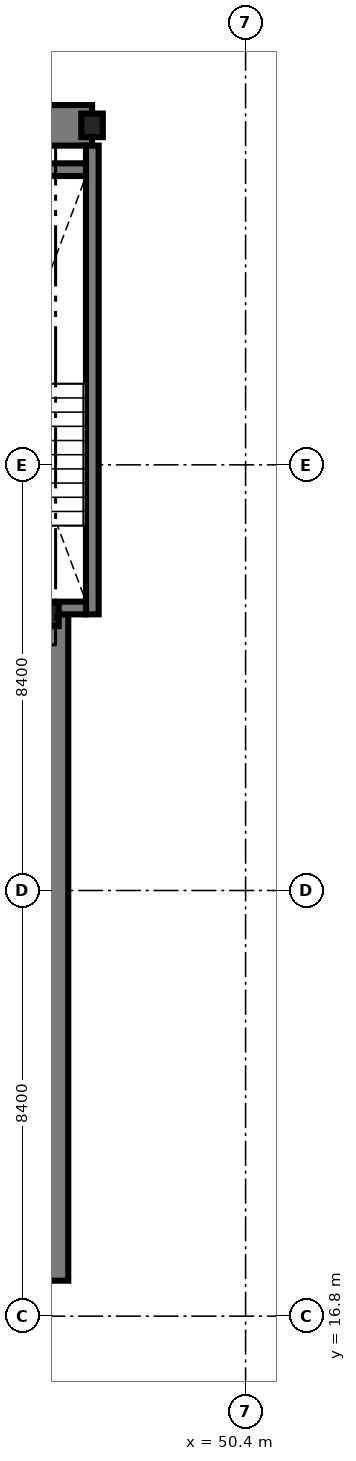
"""IFC4 building model, lengths in metres.
Left out: names, types, materials, properties, quantities, classifications, styles, units other than length and angle.
Written with IfcOpenShell. Run it as: python <this file> out.ifc"""

import sys

from ifc_helpers import new_model, si_unit, direction, frame, frame_2d, origin, origin_2d, place, context, subcontext, project, spatial, rectangle, i_section, extrude, source, transform, mapped, element, save


model = new_model("IFC4")
c1 = context("Model", 3, precision=1e-05, world=origin(), true_north=direction((0.0, 1.0)))
c2 = subcontext(c1, "Body", "Model", "MODEL_VIEW")
j1 = project(units=[si_unit("LENGTHUNIT", "METRE"), si_unit("PLANEANGLEUNIT", "RADIAN")], contexts=[c1])
p1 = place(None, origin())
s1 = spatial("IfcSite", under=j1, at=p1, CompositionType="ELEMENT")
p2 = place(p1, origin())
s2 = spatial("IfcBuilding", under=s1, at=p2, CompositionType="ELEMENT")
p3 = place(p2, frame((0.0, 0.0, 133.5)))
s3 = spatial("IfcBuildingStorey", under=s2, at=p3, CompositionType="ELEMENT", Elevation=133.5)
m1 = source(origin(), c2, "Body", "SweptSolid", [
    extrude(rectangle(XDim=17.52, YDim=0.8, at=frame_2d((8.76, 0.0))), origin(), (0.0, 0.0, 1.0), 3.46),
])
p4 = place(p3, frame((29.85, 40.3, 0.0), z_axis=(0.0, 0.0, 1.0), x_axis=(1.0, 0.0, 0.0)))
e1 = element("IfcWall", 1, at=p4, inside=s3, PredefinedType="SHEAR", context=c2, shape_type="MappedRepresentation", body=[
    mapped(m1, transform((0.0, 0.0, 0.0), scale=1.0)),
])
m2 = source(origin(), c2, "Body", "SweptSolid", [
    extrude(rectangle(XDim=13.15, YDim=0.8, at=frame_2d((6.575, 0.0))), origin(), (0.0, 0.0, 1.0), 3.46),
])
p5 = place(p3, frame((46.5, 17.5, 0.0), z_axis=(0.0, 0.0, 1.0), x_axis=(0.0, 1.0, 0.0)))
e2 = element("IfcWall", 2, at=p5, inside=s3, PredefinedType="SHEAR", context=c2, shape_type="MappedRepresentation", body=[
    mapped(m2, transform((0.0, 0.0, 0.0), scale=1.0)),
])
m3 = source(origin(), c2, "Body", "SweptSolid", [
    extrude(i_section(OverallWidth=0.424, OverallDepth=0.465, WebThickness=0.035, FlangeThickness=0.056, FilletRadius=0.015, at=origin_2d()), origin(), (0.0, 0.0, 1.0), 3.46),
])
for number, where, z_axis, x_axis in (
    (3, (46.5, 30.65, 0.0), (0.0, 0.0, 1.0), (1.0, 0.0, 0.0)),
    (4, (47.37, 40.3, 0.0), (0.0, 0.0, 1.0), (1.0, 0.0, 0.0)),
):
    element("IfcColumn", number, at=place(p3, frame(where, z_axis=z_axis, x_axis=x_axis)), inside=s3, PredefinedType="COLUMN", context=c2, shape_type="MappedRepresentation", body=[
        mapped(m3, transform((0.0, 0.0, 0.0), scale=1.0)),
    ])
m4 = source(origin(), c2, "Body", "SweptSolid", [
    extrude(rectangle(XDim=9.25, YDim=0.25, at=frame_2d((4.625, 0.0))), origin(), (0.0, 0.0, 1.0), 3.5),
])
p6 = place(p3, frame((47.375, 30.65, 0.0), z_axis=(0.0, 0.0, 1.0), x_axis=(0.0, 1.0, 0.0)))
e5 = element("IfcWall", 5, at=p6, inside=s3, PredefinedType="SOLIDWALL", context=c2, shape_type="MappedRepresentation", body=[
    mapped(m4, transform((0.0, 0.0, 0.0), scale=1.0)),
])
m5 = source(origin(), c2, "Body", "SweptSolid", [
    extrude(rectangle(XDim=3.15, YDim=0.25, at=frame_2d((1.575, 0.0))), origin(), (0.0, 0.0, 1.0), 3.5),
])
p7 = place(p3, frame((44.1, 39.425, 0.0), z_axis=(0.0, 0.0, 1.0), x_axis=(1.0, 0.0, 0.0)))
e6 = element("IfcWall", 6, at=p7, inside=s3, PredefinedType="SOLIDWALL", context=c2, shape_type="MappedRepresentation", body=[
    mapped(m5, transform((0.0, 0.0, 0.0), scale=1.0)),
])
p8 = place(p3, frame((44.1, 30.775, 0.0), z_axis=(0.0, 0.0, 1.0), x_axis=(1.0, 0.0, 0.0)))
e7 = element("IfcWall", 7, at=p8, inside=s3, PredefinedType="SOLIDWALL", context=c2, shape_type="MappedRepresentation", body=[
    mapped(m5, transform((0.0, 0.0, 0.0), scale=1.0)),
])
m6 = source(origin(), c2, "Body", "SweptSolid", [
    extrude(rectangle(XDim=1.1, YDim=2.2, at=frame_2d((0.55, 1.1))), frame((0.0, 0.135, 0.0), z_axis=(0.0, -1.0, 0.0), x_axis=(1.0, 0.0, 0.0)), (0.0, 0.0, 1.0), 0.27),
])
p9 = place(p8, frame((0.35, 0.0, 0.0)))
e8 = element("IfcOpeningElement", 8, at=p9, cuts=e7, PredefinedType="OPENING", context=c2, shape_type="MappedRepresentation", body=[
    mapped(m6, transform((0.0, 0.0, 0.0), scale=1.0)),
])
save(model, sys.argv[1])
